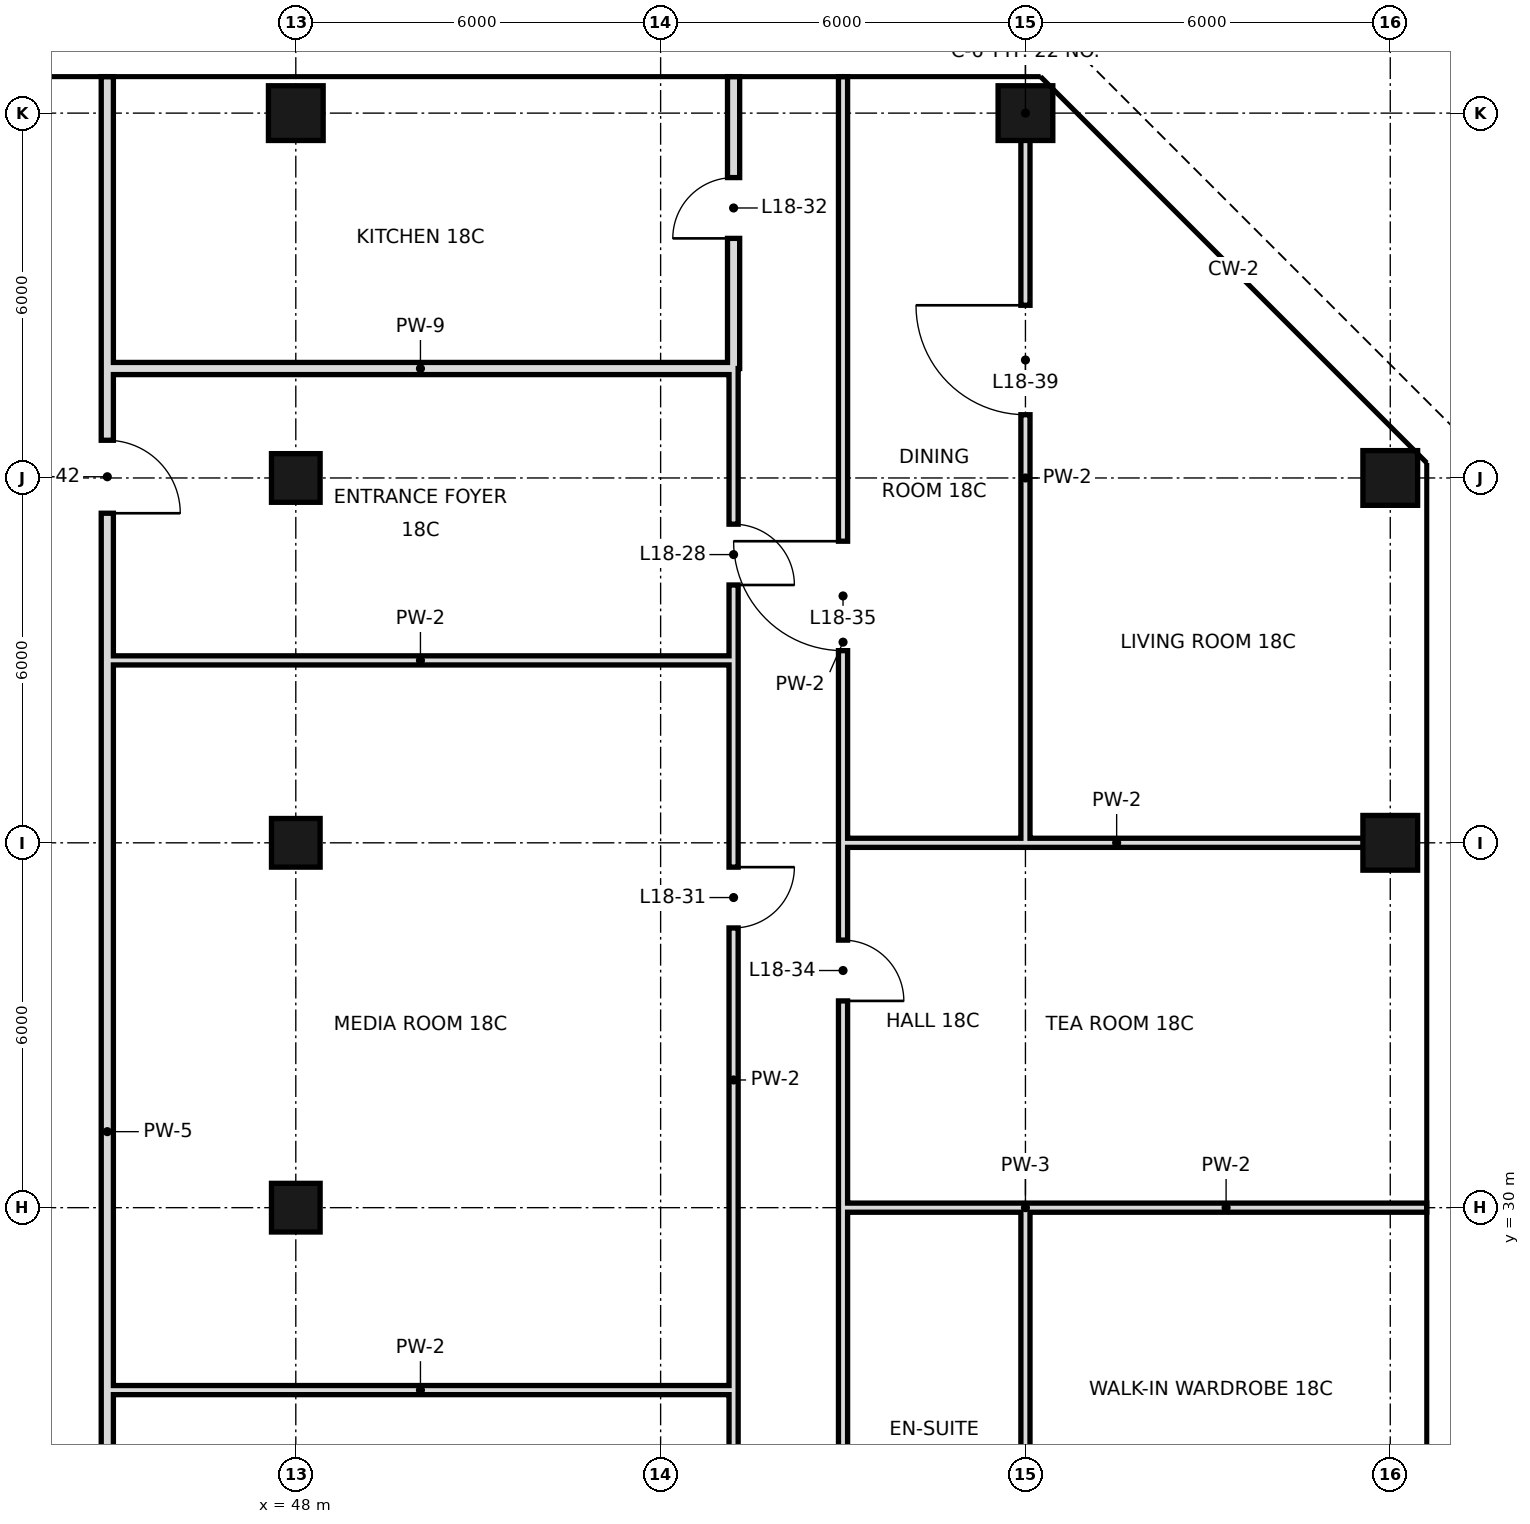
"""IFC4 building model, lengths in metres.
Left out: names, types, materials, properties, quantities, classifications, styles, units other than length and angle.
Written with IfcOpenShell. Run it as: python <this file> out.ifc"""

import sys

from ifc_helpers import new_model, si_unit, direction, frame, frame_2d, origin, origin_2d, place, context, subcontext, project, spatial, rectangle, hollow_rectangle, extrude, element, fill, save


model = new_model("IFC4")
c1 = context("Model", 3, precision=1e-05, world=origin(), true_north=direction((0.0, 1.0)))
c2 = subcontext(c1, "Body", "Model", "MODEL_VIEW")
j1 = project(units=[si_unit("LENGTHUNIT", "METRE"), si_unit("PLANEANGLEUNIT", "RADIAN")], contexts=[c1])
p1 = place(None, origin())
s1 = spatial("IfcSite", under=j1, at=p1, CompositionType="ELEMENT")
p2 = place(p1, origin())
s2 = spatial("IfcBuilding", under=s1, at=p2, CompositionType="ELEMENT")
p3 = place(p2, frame((0.0, 0.0, 85.8)))
s3 = spatial("IfcBuildingStorey", under=s2, at=p3, CompositionType="ELEMENT", Elevation=85.8)
for number, where, z_axis, x_axis in (
    (1, (48.0, 30.0, 0.0), (0.0, 0.0, 1.0), (1.0, 0.0, 0.0)),
    (2, (48.0, 36.0, 0.0), (0.0, 0.0, 1.0), (1.0, 0.0, 0.0)),
    (3, (48.0, 42.0, 0.0), (0.0, 0.0, 1.0), (1.0, 0.0, 0.0)),
):
    element("IfcColumn", number, at=place(p3, frame(where, z_axis=z_axis, x_axis=x_axis)), inside=s3, PredefinedType="COLUMN", context=c2, shape_type="SweptSolid", body=[
        extrude(hollow_rectangle(XDim=0.8, YDim=0.8, WallThickness=0.04, at=origin_2d()), origin(), (0.0, 0.0, 1.0), 4.4),
    ])
for number, where, z_axis, x_axis in (
    (4, (48.0, 48.0, 0.0), (0.0, 0.0, 1.0), (1.0, 0.0, 0.0)),
    (5, (60.0, 48.0, 0.0), (0.0, 0.0, 1.0), (1.0, 0.0, 0.0)),
    (6, (66.0, 36.0, 0.0), (0.0, 0.0, 1.0), (1.0, 0.0, 0.0)),
    (7, (66.0, 42.0, 0.0), (0.0, 0.0, 1.0), (1.0, 0.0, 0.0)),
):
    element("IfcColumn", number, at=place(p3, frame(where, z_axis=z_axis, x_axis=x_axis)), inside=s3, PredefinedType="COLUMN", context=c2, shape_type="SweptSolid", body=[
        extrude(hollow_rectangle(XDim=0.9, YDim=0.9, WallThickness=0.045, at=origin_2d()), origin(), (0.0, 0.0, 1.0), 4.4),
    ])
p4 = place(p3, frame((44.9, 18.7, 0.0), z_axis=(0.0, 0.0, 1.0), x_axis=(0.0, 1.0, 0.0)))
e8 = element("IfcWall", 8, at=p4, inside=s3, PredefinedType="SOLIDWALL", context=c2, shape_type="SweptSolid", body=[
    extrude(rectangle(XDim=25.1, YDim=0.2, at=frame_2d((12.55, 0.0))), origin(), (0.0, 0.0, 1.0), 3.65),
])
p5 = place(p4, frame((22.72, 0.0, 0.0)))
e9 = element("IfcOpeningElement", 9, at=p5, cuts=e8, PredefinedType="OPENING", context=c2, shape_type="SweptSolid", body=[
    extrude(rectangle(XDim=1.2, YDim=2.4, at=frame_2d((0.6, 1.2))), frame((0.0, 0.11, 0.0), z_axis=(0.0, -1.0, 0.0), x_axis=(1.0, 0.0, 0.0)), (0.0, 0.0, 1.0), 0.22),
])
p6 = place(p3, frame((44.9, 43.8, 0.0), z_axis=(0.0, 0.0, 1.0), x_axis=(0.0, 1.0, 0.0)))
e10 = element("IfcWall", 10, at=p6, inside=s3, PredefinedType="SOLIDWALL", context=c2, shape_type="SweptSolid", body=[
    extrude(rectangle(XDim=4.8, YDim=0.2, at=frame_2d((2.4, 0.0))), origin(), (0.0, 0.0, 1.0), 3.4),
])
p7 = place(p3, frame((55.2, 43.8, 0.0), z_axis=(0.0, 0.0, 1.0), x_axis=(0.0, 1.0, 0.0)))
e11 = element("IfcWall", 11, at=p7, inside=s3, PredefinedType="SOLIDWALL", context=c2, shape_type="SweptSolid", body=[
    extrude(rectangle(XDim=4.8, YDim=0.2, at=frame_2d((2.4, 0.0))), origin(), (0.0, 0.0, 1.0), 4.1),
])
p8 = place(p7, frame((2.14, 0.0, 0.0)))
e12 = element("IfcOpeningElement", 12, at=p8, cuts=e11, PredefinedType="OPENING", context=c2, shape_type="SweptSolid", body=[
    extrude(rectangle(XDim=1.0, YDim=2.4, at=frame_2d((0.5, 1.2))), frame((0.0, 0.11, 0.0), z_axis=(0.0, -1.0, 0.0), x_axis=(1.0, 0.0, 0.0)), (0.0, 0.0, 1.0), 0.22),
])
p9 = place(p3, frame((55.2, 20.4, 0.0), z_axis=(0.0, 0.0, 1.0), x_axis=(0.0, 1.0, 0.0)))
e13 = element("IfcWall", 13, at=p9, inside=s3, PredefinedType="PARTITIONING", context=c2, shape_type="SweptSolid", body=[
    extrude(rectangle(XDim=23.4, YDim=0.15, at=frame_2d((11.7, 0.0))), origin(), (0.0, 0.0, 1.0), 4.1),
])
p10 = place(p9, frame((19.84, 0.0, 0.0)))
e14 = element("IfcOpeningElement", 14, at=p10, cuts=e13, PredefinedType="OPENING", context=c2, shape_type="SweptSolid", body=[
    extrude(rectangle(XDim=1.0, YDim=2.4, at=frame_2d((0.5, 1.2))), frame((0.0, 0.085, 0.0), z_axis=(0.0, -1.0, 0.0), x_axis=(1.0, 0.0, 0.0)), (0.0, 0.0, 1.0), 0.17),
])
p11 = place(p9, frame((3.82, 0.0, 0.0)))
e15 = element("IfcOpeningElement", 15, at=p11, cuts=e13, PredefinedType="OPENING", context=c2, shape_type="SweptSolid", body=[
    extrude(rectangle(XDim=1.0, YDim=2.4, at=frame_2d((0.5, 1.2))), frame((0.0, 0.085, 0.0), z_axis=(0.0, -1.0, 0.0), x_axis=(1.0, 0.0, 0.0)), (0.0, 0.0, 1.0), 0.17),
])
p12 = place(p9, frame((14.2, 0.0, 0.0)))
e16 = element("IfcOpeningElement", 16, at=p12, cuts=e13, PredefinedType="OPENING", context=c2, shape_type="SweptSolid", body=[
    extrude(rectangle(XDim=1.0, YDim=2.4, at=frame_2d((0.5, 1.2))), frame((0.0, 0.085, 0.0), z_axis=(0.0, -1.0, 0.0), x_axis=(1.0, 0.0, 0.0)), (0.0, 0.0, 1.0), 0.17),
])
p13 = place(p3, frame((57.0, 30.0, 0.0), z_axis=(0.0, 0.0, 1.0), x_axis=(0.0, 1.0, 0.0)))
e17 = element("IfcWall", 17, at=p13, inside=s3, PredefinedType="PARTITIONING", context=c2, shape_type="SweptSolid", body=[
    extrude(rectangle(XDim=18.6, YDim=0.15, at=frame_2d((9.3, 0.0))), origin(), (0.0, 0.0, 1.0), 4.1),
])
p14 = place(p13, frame((3.4, 0.0, 0.0)))
e18 = element("IfcOpeningElement", 18, at=p14, cuts=e17, PredefinedType="OPENING", context=c2, shape_type="SweptSolid", body=[
    extrude(rectangle(XDim=1.0, YDim=2.4, at=frame_2d((0.5, 1.2))), frame((0.0, 0.085, 0.0), z_axis=(0.0, -1.0, 0.0), x_axis=(1.0, 0.0, 0.0)), (0.0, 0.0, 1.0), 0.17),
])
p15 = place(p13, frame((9.16, 0.0, 0.0)))
e19 = element("IfcOpeningElement", 19, at=p15, cuts=e17, PredefinedType="OPENING", context=c2, shape_type="SweptSolid", body=[
    extrude(rectangle(XDim=1.8, YDim=2.4, at=frame_2d((0.9, 1.2))), frame((0.0, 0.085, 0.0), z_axis=(0.0, -1.0, 0.0), x_axis=(1.0, 0.0, 0.0)), (0.0, 0.0, 1.0), 0.17),
])
p16 = place(p3, frame((57.0, 21.6, 0.0), z_axis=(0.0, 0.0, 1.0), x_axis=(0.0, 1.0, 0.0)))
e20 = element("IfcWall", 20, at=p16, inside=s3, PredefinedType="PARTITIONING", context=c2, shape_type="SweptSolid", body=[
    extrude(rectangle(XDim=8.4, YDim=0.15, at=frame_2d((4.2, 0.0))), origin(), (0.0, 0.0, 1.0), 4.1),
])
p17 = place(p3, frame((60.0, 36.0, 0.0), z_axis=(0.0, 0.0, 1.0), x_axis=(0.0, 1.0, 0.0)))
e21 = element("IfcWall", 21, at=p17, inside=s3, PredefinedType="PARTITIONING", context=c2, shape_type="SweptSolid", body=[
    extrude(rectangle(XDim=12.0, YDim=0.15, at=frame_2d((6.0, 0.0))), origin(), (0.0, 0.0, 1.0), 4.1),
])
p18 = place(p17, frame((7.04, 0.0, 0.0)))
e22 = element("IfcOpeningElement", 22, at=p18, cuts=e21, PredefinedType="OPENING", context=c2, shape_type="SweptSolid", body=[
    extrude(rectangle(XDim=1.8, YDim=2.4, at=frame_2d((0.9, 1.2))), frame((0.0, 0.085, 0.0), z_axis=(0.0, -1.0, 0.0), x_axis=(1.0, 0.0, 0.0)), (0.0, 0.0, 1.0), 0.17),
])
p19 = place(p3, frame((60.0, 21.6, 0.0), z_axis=(0.0, 0.0, 1.0), x_axis=(0.0, 1.0, 0.0)))
e23 = element("IfcWall", 23, at=p19, inside=s3, PredefinedType="PARTITIONING", context=c2, shape_type="SweptSolid", body=[
    extrude(rectangle(XDim=8.4, YDim=0.15, at=frame_2d((4.2, 0.0))), origin(), (0.0, 0.0, 1.0), 4.1),
])
p20 = place(p19, frame((0.95, 0.0, 0.0)))
e24 = element("IfcOpeningElement", 24, at=p20, cuts=e23, PredefinedType="OPENING", context=c2, shape_type="SweptSolid", body=[
    extrude(rectangle(XDim=0.9, YDim=2.4, at=frame_2d((0.45, 1.2))), frame((0.0, 0.085, 0.0), z_axis=(0.0, -1.0, 0.0), x_axis=(1.0, 0.0, 0.0)), (0.0, 0.0, 1.0), 0.17),
])
p21 = place(p3, frame((44.9, 27.0, 0.0), z_axis=(0.0, 0.0, 1.0), x_axis=(1.0, 0.0, 0.0)))
e25 = element("IfcWall", 25, at=p21, inside=s3, PredefinedType="PARTITIONING", context=c2, shape_type="SweptSolid", body=[
    extrude(rectangle(XDim=10.3, YDim=0.15, at=frame_2d((5.15, 0.0))), origin(), (0.0, 0.0, 1.0), 4.1),
])
p22 = place(p3, frame((60.0, 30.0, 0.0), z_axis=(0.0, 0.0, 1.0), x_axis=(1.0, 0.0, 0.0)))
e26 = element("IfcWall", 26, at=p22, inside=s3, PredefinedType="PARTITIONING", context=c2, shape_type="SweptSolid", body=[
    extrude(rectangle(XDim=6.6, YDim=0.15, at=frame_2d((3.3, 0.0))), origin(), (0.0, 0.0, 1.0), 3.2),
])
p23 = place(p3, frame((57.0, 30.0, 0.0), z_axis=(0.0, 0.0, 1.0), x_axis=(1.0, 0.0, 0.0)))
e27 = element("IfcWall", 27, at=p23, inside=s3, PredefinedType="PARTITIONING", context=c2, shape_type="SweptSolid", body=[
    extrude(rectangle(XDim=3.0, YDim=0.15, at=frame_2d((1.5, 0.0))), origin(), (0.0, 0.0, 1.0), 3.2),
])
p24 = place(p3, frame((57.0, 36.0, 0.0), z_axis=(0.0, 0.0, 1.0), x_axis=(1.0, 0.0, 0.0)))
e28 = element("IfcWall", 28, at=p24, inside=s3, PredefinedType="PARTITIONING", context=c2, shape_type="SweptSolid", body=[
    extrude(rectangle(XDim=9.0, YDim=0.15, at=frame_2d((4.5, 0.0))), origin(), (0.0, 0.0, 1.0), 3.2),
])
p25 = place(p3, frame((44.9, 39.0, 0.0), z_axis=(0.0, 0.0, 1.0), x_axis=(1.0, 0.0, 0.0)))
e29 = element("IfcWall", 29, at=p25, inside=s3, PredefinedType="PARTITIONING", context=c2, shape_type="SweptSolid", body=[
    extrude(rectangle(XDim=10.3, YDim=0.15, at=frame_2d((5.15, 0.0))), origin(), (0.0, 0.0, 1.0), 4.1),
])
p26 = place(p3, frame((44.9, 43.8, 0.0), z_axis=(0.0, 0.0, 1.0), x_axis=(1.0, 0.0, 0.0)))
e30 = element("IfcWall", 30, at=p26, inside=s3, PredefinedType="SOLIDWALL", context=c2, shape_type="SweptSolid", body=[
    extrude(rectangle(XDim=10.3, YDim=0.2, at=frame_2d((5.15, 0.0))), origin(), (0.0, 0.0, 1.0), 3.65),
])
p27 = place(p10, frame((1.0, 0.0, 0.0), z_axis=(0.0, 0.0, 1.0), x_axis=(-1.0, 0.0, 0.0)))
e31 = element("IfcDoor", 31, at=p27, inside=s3, OperationType="SINGLE_SWING_RIGHT", PredefinedType="DOOR", context=c2, shape_type="SweptSolid", body=[
    extrude(rectangle(XDim=1.0, YDim=2.4, at=frame_2d((0.5, 1.2))), frame((0.0, 0.025, 0.0), z_axis=(0.0, -1.0, 0.0), x_axis=(1.0, 0.0, 0.0)), (0.0, 0.0, 1.0), 0.05),
])
fill(e14, e31)
p28 = place(p12, origin())
e32 = element("IfcDoor", 32, at=p28, inside=s3, OperationType="SINGLE_SWING_RIGHT", PredefinedType="DOOR", context=c2, shape_type="SweptSolid", body=[
    extrude(rectangle(XDim=1.0, YDim=2.4, at=frame_2d((0.5, 1.2))), frame((0.0, 0.025, 0.0), z_axis=(0.0, -1.0, 0.0), x_axis=(1.0, 0.0, 0.0)), (0.0, 0.0, 1.0), 0.05),
])
fill(e16, e32)
p29 = place(p8, origin())
e33 = element("IfcDoor", 33, at=p29, inside=s3, OperationType="SINGLE_SWING_LEFT", PredefinedType="DOOR", context=c2, shape_type="SweptSolid", body=[
    extrude(rectangle(XDim=1.0, YDim=2.4, at=frame_2d((0.5, 1.2))), frame((0.0, 0.025, 0.0), z_axis=(0.0, -1.0, 0.0), x_axis=(1.0, 0.0, 0.0)), (0.0, 0.0, 1.0), 0.05),
])
fill(e12, e33)
p30 = place(p14, frame((1.0, 0.0, 0.0), z_axis=(0.0, 0.0, 1.0), x_axis=(-1.0, 0.0, 0.0)))
e34 = element("IfcDoor", 34, at=p30, inside=s3, OperationType="SINGLE_SWING_RIGHT", PredefinedType="DOOR", context=c2, shape_type="SweptSolid", body=[
    extrude(rectangle(XDim=1.0, YDim=2.4, at=frame_2d((0.5, 1.2))), frame((0.0, 0.025, 0.0), z_axis=(0.0, -1.0, 0.0), x_axis=(1.0, 0.0, 0.0)), (0.0, 0.0, 1.0), 0.05),
])
fill(e18, e34)
p31 = place(p15, frame((1.8, 0.0, 0.0), z_axis=(0.0, 0.0, 1.0), x_axis=(-1.0, 0.0, 0.0)))
e35 = element("IfcDoor", 35, at=p31, inside=s3, OperationType="SINGLE_SWING_LEFT", PredefinedType="DOOR", context=c2, shape_type="SweptSolid", body=[
    extrude(rectangle(XDim=1.8, YDim=2.4, at=frame_2d((0.9, 1.2))), frame((0.0, 0.025, 0.0), z_axis=(0.0, -1.0, 0.0), x_axis=(1.0, 0.0, 0.0)), (0.0, 0.0, 1.0), 0.05),
])
fill(e19, e35)
p32 = place(p18, frame((1.8, 0.0, 0.0), z_axis=(0.0, 0.0, 1.0), x_axis=(-1.0, 0.0, 0.0)))
e36 = element("IfcDoor", 36, at=p32, inside=s3, OperationType="SINGLE_SWING_LEFT", PredefinedType="DOOR", context=c2, shape_type="SweptSolid", body=[
    extrude(rectangle(XDim=1.8, YDim=2.4, at=frame_2d((0.9, 1.2))), frame((0.0, 0.025, 0.0), z_axis=(0.0, -1.0, 0.0), x_axis=(1.0, 0.0, 0.0)), (0.0, 0.0, 1.0), 0.05),
])
fill(e22, e36)
p33 = place(p5, frame((1.2, 0.0, 0.0), z_axis=(0.0, 0.0, 1.0), x_axis=(-1.0, 0.0, 0.0)))
e37 = element("IfcDoor", 37, at=p33, inside=s3, OperationType="SINGLE_SWING_RIGHT", PredefinedType="DOOR", context=c2, shape_type="SweptSolid", body=[
    extrude(rectangle(XDim=1.2, YDim=2.4, at=frame_2d((0.6, 1.2))), frame((0.0, 0.025, 0.0), z_axis=(0.0, -1.0, 0.0), x_axis=(1.0, 0.0, 0.0)), (0.0, 0.0, 1.0), 0.05),
])
fill(e9, e37)
save(model, sys.argv[1])
